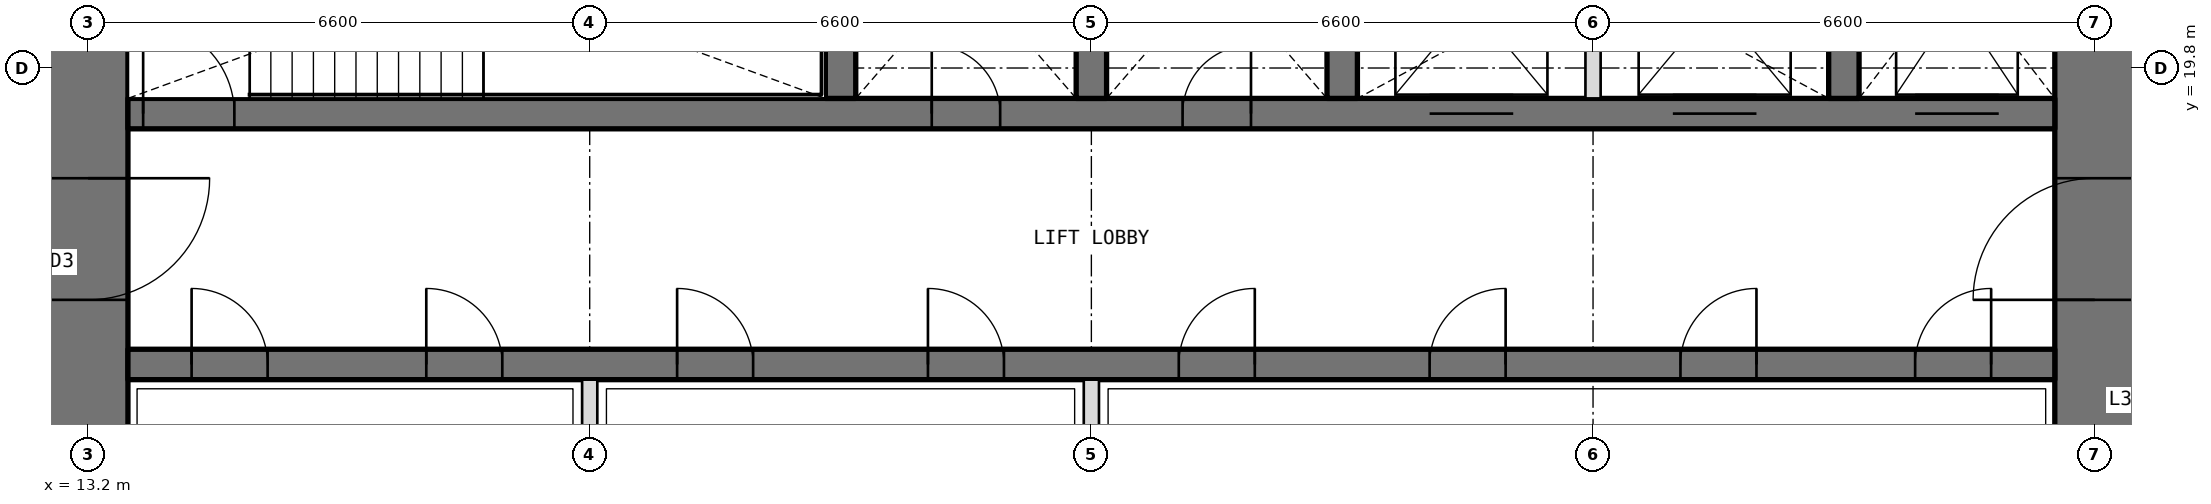
"""IFC4 building model, lengths in metres.
Left out: names, types, materials, properties, quantities, classifications, styles, units other than length and angle.
Written with IfcOpenShell. Run it as: python <this file> out.ifc"""

import sys

from ifc_helpers import new_model, si_unit, direction, frame, frame_2d, origin, place, context, subcontext, project, spatial, rectangle, extrude, element, fill, save


model = new_model("IFC4")
c1 = context("Model", 3, precision=1e-05, world=origin(), true_north=direction((0.0, 1.0)))
c2 = subcontext(c1, "Body", "Model", "MODEL_VIEW")
j1 = project(units=[si_unit("LENGTHUNIT", "METRE"), si_unit("PLANEANGLEUNIT", "RADIAN")], contexts=[c1])
p1 = place(None, origin())
s1 = spatial("IfcSite", under=j1, at=p1, CompositionType="ELEMENT")
p2 = place(p1, origin())
s2 = spatial("IfcBuilding", under=s1, at=p2, CompositionType="ELEMENT")
p3 = place(p2, frame((0.0, 0.0, 172.5)))
s3 = spatial("IfcBuildingStorey", under=s2, at=p3, CompositionType="ELEMENT", Elevation=172.5)
p4 = place(p3, frame((39.6, 13.725, 0.0), z_axis=(0.0, 0.0, 1.0), x_axis=(0.0, 1.0, 0.0)))
e1 = element("IfcWall", 1, at=p4, inside=s3, PredefinedType="SHEAR", context=c2, shape_type="SweptSolid", body=[
    extrude(rectangle(XDim=18.75, YDim=1.05, at=frame_2d((9.375, 0.0))), origin(), (0.0, 0.0, 1.0), 4.2),
])
p5 = place(p4, frame((3.025, 0.0, 0.0)))
e2 = element("IfcOpeningElement", 2, at=p5, cuts=e1, PredefinedType="OPENING", context=c2, shape_type="SweptSolid", body=[
    extrude(rectangle(XDim=1.6, YDim=2.1, at=frame_2d((0.8, 1.05))), frame((0.0, 0.535, 0.0), z_axis=(0.0, -1.0, 0.0), x_axis=(1.0, 0.0, 0.0)), (0.0, 0.0, 1.0), 1.07),
])
p6 = place(p4, frame((13.825, 0.0, 0.0)))
e3 = element("IfcOpeningElement", 3, at=p6, cuts=e1, PredefinedType="OPENING", context=c2, shape_type="SweptSolid", body=[
    extrude(rectangle(XDim=1.6, YDim=2.1, at=frame_2d((0.8, 1.05))), frame((0.0, 0.535, 0.0), z_axis=(0.0, -1.0, 0.0), x_axis=(1.0, 0.0, 0.0)), (0.0, 0.0, 1.0), 1.07),
])
p7 = place(p3, frame((13.2, 32.475, 0.0), z_axis=(0.0, 0.0, 1.0), x_axis=(0.0, -1.0, 0.0)))
e4 = element("IfcWall", 4, at=p7, inside=s3, PredefinedType="SHEAR", context=c2, shape_type="SweptSolid", body=[
    extrude(rectangle(XDim=18.75, YDim=1.05, at=frame_2d((9.375, 0.0))), origin(), (0.0, 0.0, 1.0), 4.2),
])
p8 = place(p7, frame((14.125, 0.0, 0.0)))
e5 = element("IfcOpeningElement", 5, at=p8, cuts=e4, PredefinedType="OPENING", context=c2, shape_type="SweptSolid", body=[
    extrude(rectangle(XDim=1.6, YDim=2.1, at=frame_2d((0.8, 1.05))), frame((0.0, 0.535, 0.0), z_axis=(0.0, -1.0, 0.0), x_axis=(1.0, 0.0, 0.0)), (0.0, 0.0, 1.0), 1.07),
])
p9 = place(p7, frame((3.325, 0.0, 0.0)))
e6 = element("IfcOpeningElement", 6, at=p9, cuts=e4, PredefinedType="OPENING", context=c2, shape_type="SweptSolid", body=[
    extrude(rectangle(XDim=1.6, YDim=2.1, at=frame_2d((0.8, 1.05))), frame((0.0, 0.535, 0.0), z_axis=(0.0, -1.0, 0.0), x_axis=(1.0, 0.0, 0.0)), (0.0, 0.0, 1.0), 1.07),
])
p10 = place(p3, frame((13.725, 15.9, 0.0), z_axis=(0.0, 0.0, 1.0), x_axis=(1.0, 0.0, 0.0)))
e7 = element("IfcWall", 7, at=p10, inside=s3, PredefinedType="SHEAR", context=c2, shape_type="SweptSolid", body=[
    extrude(rectangle(XDim=25.35, YDim=0.4, at=frame_2d((12.675, 0.0))), origin(), (0.0, 0.0, 1.0), 4.2),
])
p11 = place(p10, frame((0.837, 0.0, 0.0)))
e8 = element("IfcOpeningElement", 8, at=p11, cuts=e7, PredefinedType="OPENING", context=c2, shape_type="SweptSolid", body=[
    extrude(rectangle(XDim=1.0, YDim=2.1, at=frame_2d((0.5, 1.05))), frame((0.0, 0.21, 0.0), z_axis=(0.0, -1.0, 0.0), x_axis=(1.0, 0.0, 0.0)), (0.0, 0.0, 1.0), 0.42),
])
p12 = place(p10, frame((3.925, 0.0, 0.0)))
e9 = element("IfcOpeningElement", 9, at=p12, cuts=e7, PredefinedType="OPENING", context=c2, shape_type="SweptSolid", body=[
    extrude(rectangle(XDim=1.0, YDim=2.1, at=frame_2d((0.5, 1.05))), frame((0.0, 0.21, 0.0), z_axis=(0.0, -1.0, 0.0), x_axis=(1.0, 0.0, 0.0)), (0.0, 0.0, 1.0), 0.42),
])
p13 = place(p10, frame((7.225, 0.0, 0.0)))
e10 = element("IfcOpeningElement", 10, at=p13, cuts=e7, PredefinedType="OPENING", context=c2, shape_type="SweptSolid", body=[
    extrude(rectangle(XDim=1.0, YDim=2.1, at=frame_2d((0.5, 1.05))), frame((0.0, 0.21, 0.0), z_axis=(0.0, -1.0, 0.0), x_axis=(1.0, 0.0, 0.0)), (0.0, 0.0, 1.0), 0.42),
])
p14 = place(p10, frame((10.525, 0.0, 0.0)))
e11 = element("IfcOpeningElement", 11, at=p14, cuts=e7, PredefinedType="OPENING", context=c2, shape_type="SweptSolid", body=[
    extrude(rectangle(XDim=1.0, YDim=2.1, at=frame_2d((0.5, 1.05))), frame((0.0, 0.21, 0.0), z_axis=(0.0, -1.0, 0.0), x_axis=(1.0, 0.0, 0.0)), (0.0, 0.0, 1.0), 0.42),
])
p15 = place(p10, frame((13.825, 0.0, 0.0)))
e12 = element("IfcOpeningElement", 12, at=p15, cuts=e7, PredefinedType="OPENING", context=c2, shape_type="SweptSolid", body=[
    extrude(rectangle(XDim=1.0, YDim=2.1, at=frame_2d((0.5, 1.05))), frame((0.0, 0.21, 0.0), z_axis=(0.0, -1.0, 0.0), x_axis=(1.0, 0.0, 0.0)), (0.0, 0.0, 1.0), 0.42),
])
p16 = place(p10, frame((17.125, 0.0, 0.0)))
e13 = element("IfcOpeningElement", 13, at=p16, cuts=e7, PredefinedType="OPENING", context=c2, shape_type="SweptSolid", body=[
    extrude(rectangle(XDim=1.0, YDim=2.1, at=frame_2d((0.5, 1.05))), frame((0.0, 0.21, 0.0), z_axis=(0.0, -1.0, 0.0), x_axis=(1.0, 0.0, 0.0)), (0.0, 0.0, 1.0), 0.42),
])
p17 = place(p10, frame((20.425, 0.0, 0.0)))
e14 = element("IfcOpeningElement", 14, at=p17, cuts=e7, PredefinedType="OPENING", context=c2, shape_type="SweptSolid", body=[
    extrude(rectangle(XDim=1.0, YDim=2.1, at=frame_2d((0.5, 1.05))), frame((0.0, 0.21, 0.0), z_axis=(0.0, -1.0, 0.0), x_axis=(1.0, 0.0, 0.0)), (0.0, 0.0, 1.0), 0.42),
])
p18 = place(p10, frame((23.512, 0.0, 0.0)))
e15 = element("IfcOpeningElement", 15, at=p18, cuts=e7, PredefinedType="OPENING", context=c2, shape_type="SweptSolid", body=[
    extrude(rectangle(XDim=1.0, YDim=2.1, at=frame_2d((0.5, 1.05))), frame((0.0, 0.21, 0.0), z_axis=(0.0, -1.0, 0.0), x_axis=(1.0, 0.0, 0.0)), (0.0, 0.0, 1.0), 0.42),
])
p19 = place(p3, frame((13.725, 19.2, 0.0), z_axis=(0.0, 0.0, 1.0), x_axis=(1.0, 0.0, 0.0)))
e16 = element("IfcWall", 16, at=p19, inside=s3, PredefinedType="SHEAR", context=c2, shape_type="SweptSolid", body=[
    extrude(rectangle(XDim=25.35, YDim=0.4, at=frame_2d((12.675, 0.0))), origin(), (0.0, 0.0, 1.0), 4.2),
])
p20 = place(p19, frame((10.575, 0.0, 0.0)))
e17 = element("IfcOpeningElement", 17, at=p20, cuts=e16, PredefinedType="OPENING", context=c2, shape_type="SweptSolid", body=[
    extrude(rectangle(XDim=0.9, YDim=2.1, at=frame_2d((0.45, 1.05))), frame((0.0, 0.21, 0.0), z_axis=(0.0, -1.0, 0.0), x_axis=(1.0, 0.0, 0.0)), (0.0, 0.0, 1.0), 0.42),
])
p21 = place(p19, frame((13.875, 0.0, 0.0)))
e18 = element("IfcOpeningElement", 18, at=p21, cuts=e16, PredefinedType="OPENING", context=c2, shape_type="SweptSolid", body=[
    extrude(rectangle(XDim=0.9, YDim=2.1, at=frame_2d((0.45, 1.05))), frame((0.0, 0.21, 0.0), z_axis=(0.0, -1.0, 0.0), x_axis=(1.0, 0.0, 0.0)), (0.0, 0.0, 1.0), 0.42),
])
p22 = place(p19, frame((0.2, 0.0, 0.0)))
e19 = element("IfcOpeningElement", 19, at=p22, cuts=e16, PredefinedType="OPENING", context=c2, shape_type="SweptSolid", body=[
    extrude(rectangle(XDim=1.2, YDim=2.1, at=frame_2d((0.6, 1.05))), frame((0.0, 0.21, 0.0), z_axis=(0.0, -1.0, 0.0), x_axis=(1.0, 0.0, 0.0)), (0.0, 0.0, 1.0), 0.42),
])
p23 = place(p19, frame((23.512, 0.0, 0.0)))
e20 = element("IfcOpeningElement", 20, at=p23, cuts=e16, PredefinedType="OPENING", context=c2, shape_type="SweptSolid", body=[
    extrude(rectangle(XDim=1.1, YDim=2.1, at=frame_2d((0.55, 1.05))), frame((0.0, 0.21, 0.0), z_axis=(0.0, -1.0, 0.0), x_axis=(1.0, 0.0, 0.0)), (0.0, 0.0, 1.0), 0.42),
])
p24 = place(p19, frame((17.125, 0.0, 0.0)))
e21 = element("IfcOpeningElement", 21, at=p24, cuts=e16, PredefinedType="OPENING", context=c2, shape_type="SweptSolid", body=[
    extrude(rectangle(XDim=1.1, YDim=2.1, at=frame_2d((0.55, 1.05))), frame((0.0, 0.21, 0.0), z_axis=(0.0, -1.0, 0.0), x_axis=(1.0, 0.0, 0.0)), (0.0, 0.0, 1.0), 0.42),
])
p25 = place(p19, frame((20.325, 0.0, 0.0)))
e22 = element("IfcOpeningElement", 22, at=p25, cuts=e16, PredefinedType="OPENING", context=c2, shape_type="SweptSolid", body=[
    extrude(rectangle(XDim=1.1, YDim=2.1, at=frame_2d((0.55, 1.05))), frame((0.0, 0.21, 0.0), z_axis=(0.0, -1.0, 0.0), x_axis=(1.0, 0.0, 0.0)), (0.0, 0.0, 1.0), 0.42),
])
for number, where, z_axis, x_axis in (
    (23, (23.1, 19.4, 0.0), (0.0, 0.0, 1.0), (0.0, 1.0, 0.0)),
    (24, (26.4, 19.4, 0.0), (0.0, 0.0, 1.0), (0.0, 1.0, 0.0)),
    (25, (29.7, 19.4, 0.0), (0.0, 0.0, 1.0), (0.0, 1.0, 0.0)),
    (26, (36.3, 19.4, 0.0), (0.0, 0.0, 1.0), (0.0, 1.0, 0.0)),
):
    element("IfcWall", number, at=place(p3, frame(where, z_axis=z_axis, x_axis=x_axis)), inside=s3, PredefinedType="SHEAR", context=c2, shape_type="SweptSolid", body=[
        extrude(rectangle(XDim=3.35, YDim=0.4, at=frame_2d((1.675, 0.0))), origin(), (0.0, 0.0, 1.0), 4.2),
    ])
for number, where, z_axis, x_axis in (
    (27, (19.8, 13.725, 0.0), (0.0, 0.0, 1.0), (0.0, 1.0, 0.0)),
    (28, (26.4, 13.725, 0.0), (0.0, 0.0, 1.0), (0.0, 1.0, 0.0)),
):
    element("IfcWall", number, at=place(p3, frame(where, z_axis=z_axis, x_axis=x_axis)), inside=s3, PredefinedType="PARTITIONING", context=c2, shape_type="SweptSolid", body=[
        extrude(rectangle(XDim=1.975, YDim=0.2, at=frame_2d((0.987, 0.0))), origin(), (0.0, 0.0, 1.0), 4.2),
    ])
p26 = place(p3, frame((33.0, 19.4, 0.0), z_axis=(0.0, 0.0, 1.0), x_axis=(0.0, 1.0, 0.0)))
e29 = element("IfcWall", 29, at=p26, inside=s3, PredefinedType="PARTITIONING", context=c2, shape_type="SweptSolid", body=[
    extrude(rectangle(XDim=3.35, YDim=0.2, at=frame_2d((1.675, 0.0))), origin(), (0.0, 0.0, 1.0), 4.2),
])
p27 = place(p20, origin())
e30 = element("IfcDoor", 30, at=p27, inside=s3, OperationType="SINGLE_SWING_LEFT", PredefinedType="DOOR", context=c2, shape_type="SweptSolid", body=[
    extrude(rectangle(XDim=0.9, YDim=2.1, at=frame_2d((0.45, 1.05))), frame((0.0, 0.025, 0.0), z_axis=(0.0, -1.0, 0.0), x_axis=(1.0, 0.0, 0.0)), (0.0, 0.0, 1.0), 0.05),
])
fill(e17, e30)
p28 = place(p21, origin())
e31 = element("IfcDoor", 31, at=p28, inside=s3, OperationType="SINGLE_SWING_RIGHT", PredefinedType="DOOR", context=c2, shape_type="SweptSolid", body=[
    extrude(rectangle(XDim=0.9, YDim=2.1, at=frame_2d((0.45, 1.05))), frame((0.0, 0.025, 0.0), z_axis=(0.0, -1.0, 0.0), x_axis=(1.0, 0.0, 0.0)), (0.0, 0.0, 1.0), 0.05),
])
fill(e18, e31)
p29 = place(p11, origin())
e32 = element("IfcDoor", 32, at=p29, inside=s3, OperationType="SINGLE_SWING_LEFT", PredefinedType="DOOR", context=c2, shape_type="SweptSolid", body=[
    extrude(rectangle(XDim=1.0, YDim=2.1, at=frame_2d((0.5, 1.05))), frame((0.0, 0.025, 0.0), z_axis=(0.0, -1.0, 0.0), x_axis=(1.0, 0.0, 0.0)), (0.0, 0.0, 1.0), 0.05),
])
fill(e8, e32)
p30 = place(p12, origin())
e33 = element("IfcDoor", 33, at=p30, inside=s3, OperationType="SINGLE_SWING_LEFT", PredefinedType="DOOR", context=c2, shape_type="SweptSolid", body=[
    extrude(rectangle(XDim=1.0, YDim=2.1, at=frame_2d((0.5, 1.05))), frame((0.0, 0.025, 0.0), z_axis=(0.0, -1.0, 0.0), x_axis=(1.0, 0.0, 0.0)), (0.0, 0.0, 1.0), 0.05),
])
fill(e9, e33)
p31 = place(p13, origin())
e34 = element("IfcDoor", 34, at=p31, inside=s3, OperationType="SINGLE_SWING_LEFT", PredefinedType="DOOR", context=c2, shape_type="SweptSolid", body=[
    extrude(rectangle(XDim=1.0, YDim=2.1, at=frame_2d((0.5, 1.05))), frame((0.0, 0.025, 0.0), z_axis=(0.0, -1.0, 0.0), x_axis=(1.0, 0.0, 0.0)), (0.0, 0.0, 1.0), 0.05),
])
fill(e10, e34)
p32 = place(p14, origin())
e35 = element("IfcDoor", 35, at=p32, inside=s3, OperationType="SINGLE_SWING_LEFT", PredefinedType="DOOR", context=c2, shape_type="SweptSolid", body=[
    extrude(rectangle(XDim=1.0, YDim=2.1, at=frame_2d((0.5, 1.05))), frame((0.0, 0.025, 0.0), z_axis=(0.0, -1.0, 0.0), x_axis=(1.0, 0.0, 0.0)), (0.0, 0.0, 1.0), 0.05),
])
fill(e11, e35)
p33 = place(p15, origin())
e36 = element("IfcDoor", 36, at=p33, inside=s3, OperationType="SINGLE_SWING_RIGHT", PredefinedType="DOOR", context=c2, shape_type="SweptSolid", body=[
    extrude(rectangle(XDim=1.0, YDim=2.1, at=frame_2d((0.5, 1.05))), frame((0.0, 0.025, 0.0), z_axis=(0.0, -1.0, 0.0), x_axis=(1.0, 0.0, 0.0)), (0.0, 0.0, 1.0), 0.05),
])
fill(e12, e36)
p34 = place(p16, origin())
e37 = element("IfcDoor", 37, at=p34, inside=s3, OperationType="SINGLE_SWING_RIGHT", PredefinedType="DOOR", context=c2, shape_type="SweptSolid", body=[
    extrude(rectangle(XDim=1.0, YDim=2.1, at=frame_2d((0.5, 1.05))), frame((0.0, 0.025, 0.0), z_axis=(0.0, -1.0, 0.0), x_axis=(1.0, 0.0, 0.0)), (0.0, 0.0, 1.0), 0.05),
])
fill(e13, e37)
p35 = place(p17, origin())
e38 = element("IfcDoor", 38, at=p35, inside=s3, OperationType="SINGLE_SWING_RIGHT", PredefinedType="DOOR", context=c2, shape_type="SweptSolid", body=[
    extrude(rectangle(XDim=1.0, YDim=2.1, at=frame_2d((0.5, 1.05))), frame((0.0, 0.025, 0.0), z_axis=(0.0, -1.0, 0.0), x_axis=(1.0, 0.0, 0.0)), (0.0, 0.0, 1.0), 0.05),
])
fill(e14, e38)
p36 = place(p18, origin())
e39 = element("IfcDoor", 39, at=p36, inside=s3, OperationType="SINGLE_SWING_RIGHT", PredefinedType="DOOR", context=c2, shape_type="SweptSolid", body=[
    extrude(rectangle(XDim=1.0, YDim=2.1, at=frame_2d((0.5, 1.05))), frame((0.0, 0.025, 0.0), z_axis=(0.0, -1.0, 0.0), x_axis=(1.0, 0.0, 0.0)), (0.0, 0.0, 1.0), 0.05),
])
fill(e15, e39)
p37 = place(p22, origin())
e40 = element("IfcDoor", 40, at=p37, inside=s3, OperationType="SINGLE_SWING_LEFT", PredefinedType="DOOR", context=c2, shape_type="SweptSolid", body=[
    extrude(rectangle(XDim=1.2, YDim=2.1, at=frame_2d((0.6, 1.05))), frame((0.0, 0.025, 0.0), z_axis=(0.0, -1.0, 0.0), x_axis=(1.0, 0.0, 0.0)), (0.0, 0.0, 1.0), 0.05),
])
fill(e19, e40)
p38 = place(p8, origin())
e41 = element("IfcDoor", 41, at=p38, inside=s3, OperationType="DOUBLE_DOOR_DOUBLE_SWING", PredefinedType="DOOR", context=c2, shape_type="SweptSolid", body=[
    extrude(rectangle(XDim=1.6, YDim=2.1, at=frame_2d((0.8, 1.05))), frame((0.0, 0.025, 0.0), z_axis=(0.0, -1.0, 0.0), x_axis=(1.0, 0.0, 0.0)), (0.0, 0.0, 1.0), 0.05),
])
fill(e5, e41)
p39 = place(p5, origin())
e42 = element("IfcDoor", 42, at=p39, inside=s3, OperationType="DOUBLE_DOOR_DOUBLE_SWING", PredefinedType="DOOR", context=c2, shape_type="SweptSolid", body=[
    extrude(rectangle(XDim=1.6, YDim=2.1, at=frame_2d((0.8, 1.05))), frame((0.0, 0.025, 0.0), z_axis=(0.0, -1.0, 0.0), x_axis=(1.0, 0.0, 0.0)), (0.0, 0.0, 1.0), 0.05),
])
fill(e2, e42)
p40 = place(p23, origin())
e43 = element("IfcDoor", 43, at=p40, inside=s3, OperationType="DOUBLE_DOOR_SLIDING", PredefinedType="DOOR", context=c2, shape_type="SweptSolid", body=[
    extrude(rectangle(XDim=1.1, YDim=2.1, at=frame_2d((0.55, 1.05))), frame((0.0, 0.025, 0.0), z_axis=(0.0, -1.0, 0.0), x_axis=(1.0, 0.0, 0.0)), (0.0, 0.0, 1.0), 0.05),
])
fill(e20, e43)
p41 = place(p24, origin())
e44 = element("IfcDoor", 44, at=p41, inside=s3, OperationType="DOUBLE_DOOR_SLIDING", PredefinedType="DOOR", context=c2, shape_type="SweptSolid", body=[
    extrude(rectangle(XDim=1.1, YDim=2.1, at=frame_2d((0.55, 1.05))), frame((0.0, 0.025, 0.0), z_axis=(0.0, -1.0, 0.0), x_axis=(1.0, 0.0, 0.0)), (0.0, 0.0, 1.0), 0.05),
])
fill(e21, e44)
p42 = place(p25, origin())
e45 = element("IfcDoor", 45, at=p42, inside=s3, OperationType="DOUBLE_DOOR_SLIDING", PredefinedType="DOOR", context=c2, shape_type="SweptSolid", body=[
    extrude(rectangle(XDim=1.1, YDim=2.1, at=frame_2d((0.55, 1.05))), frame((0.0, 0.025, 0.0), z_axis=(0.0, -1.0, 0.0), x_axis=(1.0, 0.0, 0.0)), (0.0, 0.0, 1.0), 0.05),
])
fill(e22, e45)
save(model, sys.argv[1])
